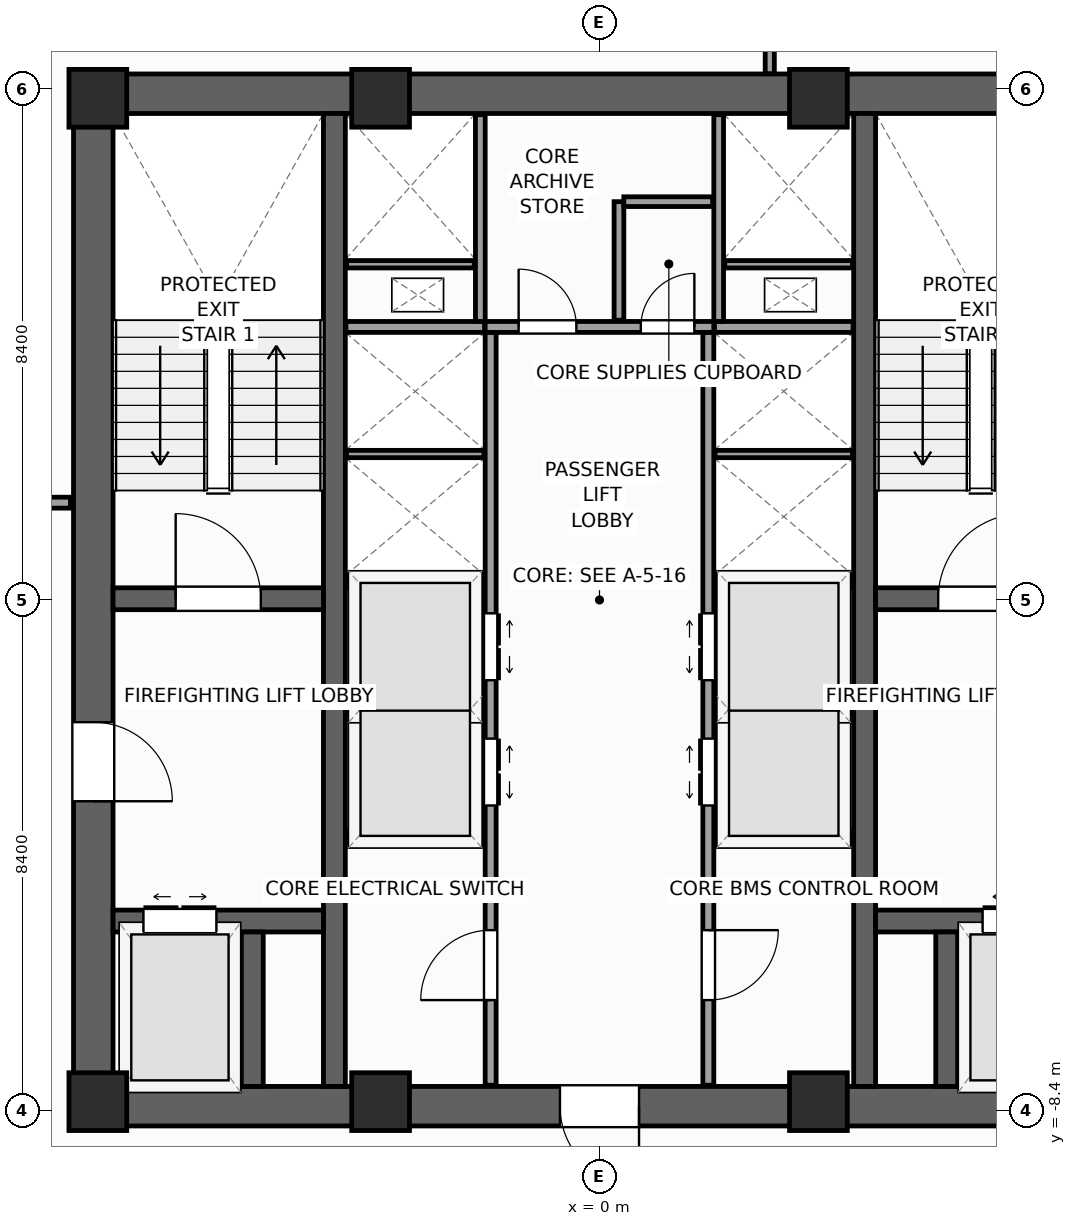
"""IFC4 building model, lengths in metres.
Left out: names, types, materials, properties, quantities, classifications, styles, units other than length and angle.
Written with IfcOpenShell. Run it as: python <this file> out.ifc"""

import sys

from ifc_helpers import new_model, si_unit, direction, frame, frame_2d, origin, origin_2d, place, context, subcontext, project, spatial, rectangle, extrude, source, transform, mapped, element, fill, save


model = new_model("IFC4")
c1 = context("Model", 3, precision=1e-05, world=origin(), true_north=direction((0.0, 1.0)))
c2 = subcontext(c1, "Body", "Model", "MODEL_VIEW")
j1 = project(units=[si_unit("LENGTHUNIT", "METRE"), si_unit("PLANEANGLEUNIT", "RADIAN")], contexts=[c1])
p1 = place(None, origin())
s1 = spatial("IfcSite", under=j1, at=p1, CompositionType="ELEMENT")
p2 = place(p1, origin())
s2 = spatial("IfcBuilding", under=s1, at=p2, CompositionType="ELEMENT")
p3 = place(p2, frame((0.0, 0.0, 196.4)))
s3 = spatial("IfcBuildingStorey", under=s2, at=p3, CompositionType="ELEMENT", Elevation=196.4)
p4 = place(p3, frame((-8.65, -8.325, 0.0), z_axis=(0.0, 0.0, 1.0), x_axis=(1.0, 0.0, 0.0)))
e1 = element("IfcWall", 1, at=p4, inside=s3, PredefinedType="SHEAR", context=c2, shape_type="SweptSolid", body=[
    extrude(rectangle(XDim=17.3, YDim=0.65, at=frame_2d((8.65, 0.0))), origin(), (0.0, 0.0, 1.0), 4.0),
])
p5 = place(p4, frame((8.0, 0.0, 0.0)))
e2 = element("IfcOpeningElement", 2, at=p5, cuts=e1, PredefinedType="OPENING", context=c2, shape_type="SweptSolid", body=[
    extrude(rectangle(XDim=1.3, YDim=2.2, at=frame_2d((0.65, 1.1))), frame((0.0, 0.335, 0.0), z_axis=(0.0, -1.0, 0.0), x_axis=(1.0, 0.0, 0.0)), (0.0, 0.0, 1.0), 0.67),
])
p6 = place(p3, frame((-8.65, 8.325, 0.0), z_axis=(0.0, 0.0, 1.0), x_axis=(1.0, 0.0, 0.0)))
e3 = element("IfcWall", 3, at=p6, inside=s3, PredefinedType="SHEAR", context=c2, shape_type="SweptSolid", body=[
    extrude(rectangle(XDim=17.3, YDim=0.65, at=frame_2d((8.65, 0.0))), origin(), (0.0, 0.0, 1.0), 4.0),
])
p7 = place(p3, frame((-8.325, -8.0, 0.0), z_axis=(0.0, 0.0, 1.0), x_axis=(0.0, 1.0, 0.0)))
e4 = element("IfcWall", 4, at=p7, inside=s3, PredefinedType="SHEAR", context=c2, shape_type="SweptSolid", body=[
    extrude(rectangle(XDim=16.0, YDim=0.65, at=frame_2d((8.0, 0.0))), origin(), (0.0, 0.0, 1.0), 4.0),
])
p8 = place(p7, frame((4.69, 0.0, 0.0)))
e5 = element("IfcOpeningElement", 5, at=p8, cuts=e4, PredefinedType="OPENING", context=c2, shape_type="SweptSolid", body=[
    extrude(rectangle(XDim=1.3, YDim=2.2, at=frame_2d((0.65, 1.1))), frame((0.0, 0.335, 0.0), z_axis=(0.0, -1.0, 0.0), x_axis=(1.0, 0.0, 0.0)), (0.0, 0.0, 1.0), 0.67),
])
for number, where, z_axis, x_axis in (
    (6, (-4.36, -8.0, 0.0), (0.0, 0.0, 1.0), (0.0, 1.0, 0.0)),
    (7, (4.36, -8.0, 0.0), (0.0, 0.0, 1.0), (0.0, 1.0, 0.0)),
):
    element("IfcWall", number, at=place(p3, frame(where, z_axis=z_axis, x_axis=x_axis)), inside=s3, PredefinedType="SHEAR", context=c2, shape_type="SweptSolid", body=[
        extrude(rectangle(XDim=16.0, YDim=0.36, at=frame_2d((8.0, 0.0))), origin(), (0.0, 0.0, 1.0), 4.0),
    ])
p9 = place(p3, frame((-8.0, 0.02, 0.0), z_axis=(0.0, 0.0, 1.0), x_axis=(1.0, 0.0, 0.0)))
e8 = element("IfcWall", 8, at=p9, inside=s3, PredefinedType="SHEAR", context=c2, shape_type="SweptSolid", body=[
    extrude(rectangle(XDim=3.46, YDim=0.36, at=frame_2d((1.73, 0.0))), origin(), (0.0, 0.0, 1.0), 4.0),
])
p10 = place(p9, frame((1.03, 0.0, 0.0)))
e9 = element("IfcOpeningElement", 9, at=p10, cuts=e8, PredefinedType="OPENING", context=c2, shape_type="SweptSolid", body=[
    extrude(rectangle(XDim=1.4, YDim=2.2, at=frame_2d((0.7, 1.1))), frame((0.0, 0.19, 0.0), z_axis=(0.0, -1.0, 0.0), x_axis=(1.0, 0.0, 0.0)), (0.0, 0.0, 1.0), 0.38),
])
p11 = place(p3, frame((4.54, 0.02, 0.0), z_axis=(0.0, 0.0, 1.0), x_axis=(1.0, 0.0, 0.0)))
e10 = element("IfcWall", 10, at=p11, inside=s3, PredefinedType="SHEAR", context=c2, shape_type="SweptSolid", body=[
    extrude(rectangle(XDim=3.46, YDim=0.36, at=frame_2d((1.73, 0.0))), origin(), (0.0, 0.0, 1.0), 4.0),
])
p12 = place(p11, frame((1.03, 0.0, 0.0)))
e11 = element("IfcOpeningElement", 11, at=p12, cuts=e10, PredefinedType="OPENING", context=c2, shape_type="SweptSolid", body=[
    extrude(rectangle(XDim=1.4, YDim=2.2, at=frame_2d((0.7, 1.1))), frame((0.0, 0.19, 0.0), z_axis=(0.0, -1.0, 0.0), x_axis=(1.0, 0.0, 0.0)), (0.0, 0.0, 1.0), 0.38),
])
p13 = place(p3, frame((-8.0, -5.28, 0.0), z_axis=(0.0, 0.0, 1.0), x_axis=(1.0, 0.0, 0.0)))
e12 = element("IfcWall", 12, at=p13, inside=s3, PredefinedType="SHEAR", context=c2, shape_type="SweptSolid", body=[
    extrude(rectangle(XDim=3.46, YDim=0.36, at=frame_2d((1.73, 0.0))), origin(), (0.0, 0.0, 1.0), 4.0),
])
p14 = place(p13, frame((0.5, 0.0, 0.0)))
e13 = element("IfcOpeningElement", 13, at=p14, cuts=e12, PredefinedType="OPENING", context=c2, shape_type="SweptSolid", body=[
    extrude(rectangle(XDim=1.2, YDim=2.25, at=frame_2d((0.6, 1.125))), frame((0.0, 0.19, 0.0), z_axis=(0.0, -1.0, 0.0), x_axis=(1.0, 0.0, 0.0)), (0.0, 0.0, 1.0), 0.38),
])
p15 = place(p3, frame((4.54, -5.28, 0.0), z_axis=(0.0, 0.0, 1.0), x_axis=(1.0, 0.0, 0.0)))
e14 = element("IfcWall", 14, at=p15, inside=s3, PredefinedType="SHEAR", context=c2, shape_type="SweptSolid", body=[
    extrude(rectangle(XDim=3.46, YDim=0.36, at=frame_2d((1.73, 0.0))), origin(), (0.0, 0.0, 1.0), 4.0),
])
p16 = place(p15, frame((1.76, 0.0, 0.0)))
e15 = element("IfcOpeningElement", 15, at=p16, cuts=e14, PredefinedType="OPENING", context=c2, shape_type="SweptSolid", body=[
    extrude(rectangle(XDim=1.2, YDim=2.25, at=frame_2d((0.6, 1.125))), frame((0.0, 0.19, 0.0), z_axis=(0.0, -1.0, 0.0), x_axis=(1.0, 0.0, 0.0)), (0.0, 0.0, 1.0), 0.38),
])
for number, where, z_axis, x_axis in (
    (16, (-5.71, -8.0, 0.0), (0.0, 0.0, 1.0), (0.0, 1.0, 0.0)),
    (17, (5.71, -8.0, 0.0), (0.0, 0.0, 1.0), (0.0, 1.0, 0.0)),
):
    element("IfcWall", number, at=place(p3, frame(where, z_axis=z_axis, x_axis=x_axis)), inside=s3, PredefinedType="SHEAR", context=c2, shape_type="SweptSolid", body=[
        extrude(rectangle(XDim=2.54, YDim=0.36, at=frame_2d((1.27, 0.0))), origin(), (0.0, 0.0, 1.0), 4.0),
    ])
m1 = source(origin(), c2, "Body", "SweptSolid", [
    extrude(rectangle(XDim=0.95, YDim=0.95, at=origin_2d()), origin(), (0.0, 0.0, 1.0), 4.0),
])
for number, where, z_axis, x_axis in (
    (18, (-8.25, -8.25, 0.0), (0.0, 0.0, 1.0), (1.0, 0.0, 0.0)),
    (19, (-8.25, 8.25, 0.0), (0.0, 0.0, 1.0), (1.0, 0.0, 0.0)),
    (20, (-3.6, -8.25, 0.0), (0.0, 0.0, 1.0), (1.0, 0.0, 0.0)),
    (21, (3.6, -8.25, 0.0), (0.0, 0.0, 1.0), (1.0, 0.0, 0.0)),
    (22, (-3.6, 8.25, 0.0), (0.0, 0.0, 1.0), (1.0, 0.0, 0.0)),
    (23, (3.6, 8.25, 0.0), (0.0, 0.0, 1.0), (1.0, 0.0, 0.0)),
):
    element("IfcColumn", number, at=place(p3, frame(where, z_axis=z_axis, x_axis=x_axis)), inside=s3, PredefinedType="PILASTER", context=c2, shape_type="MappedRepresentation", body=[
        mapped(m1, transform((0.0, 0.0, 0.0), scale=1.0)),
    ])
p17 = place(p3, frame((-1.79, -7.98, 0.0), z_axis=(0.0, 0.0, 1.0), x_axis=(0.0, 1.0, 0.0)))
e24 = element("IfcWall", 24, at=p17, inside=s3, PredefinedType="PARTITIONING", context=c2, shape_type="SweptSolid", body=[
    extrude(rectangle(XDim=12.38, YDim=0.18, at=frame_2d((6.19, 0.0))), origin(), (0.0, 0.0, 1.0), 3.6),
])
p18 = place(p17, frame((4.6, 0.0, 0.0)))
e25 = element("IfcOpeningElement", 25, at=p18, cuts=e24, PredefinedType="OPENING", context=c2, shape_type="SweptSolid", body=[
    extrude(rectangle(XDim=1.1, YDim=2.2, at=frame_2d((0.55, 1.1))), frame((0.0, 0.1, 0.0), z_axis=(0.0, -1.0, 0.0), x_axis=(1.0, 0.0, 0.0)), (0.0, 0.0, 1.0), 0.2),
])
p19 = place(p17, frame((6.66, 0.0, 0.0)))
e26 = element("IfcOpeningElement", 26, at=p19, cuts=e24, PredefinedType="OPENING", context=c2, shape_type="SweptSolid", body=[
    extrude(rectangle(XDim=1.1, YDim=2.2, at=frame_2d((0.55, 1.1))), frame((0.0, 0.1, 0.0), z_axis=(0.0, -1.0, 0.0), x_axis=(1.0, 0.0, 0.0)), (0.0, 0.0, 1.0), 0.2),
])
p20 = place(p17, frame((1.4, 0.0, 0.0)))
e27 = element("IfcOpeningElement", 27, at=p20, cuts=e24, PredefinedType="OPENING", context=c2, shape_type="SweptSolid", body=[
    extrude(rectangle(XDim=1.15, YDim=2.25, at=frame_2d((0.575, 1.125))), frame((0.0, 0.1, 0.0), z_axis=(0.0, -1.0, 0.0), x_axis=(1.0, 0.0, 0.0)), (0.0, 0.0, 1.0), 0.2),
])
p21 = place(p3, frame((1.79, -7.98, 0.0), z_axis=(0.0, 0.0, 1.0), x_axis=(0.0, 1.0, 0.0)))
e28 = element("IfcWall", 28, at=p21, inside=s3, PredefinedType="PARTITIONING", context=c2, shape_type="SweptSolid", body=[
    extrude(rectangle(XDim=12.38, YDim=0.18, at=frame_2d((6.19, 0.0))), origin(), (0.0, 0.0, 1.0), 3.6),
])
p22 = place(p21, frame((4.6, 0.0, 0.0)))
e29 = element("IfcOpeningElement", 29, at=p22, cuts=e28, PredefinedType="OPENING", context=c2, shape_type="SweptSolid", body=[
    extrude(rectangle(XDim=1.1, YDim=2.2, at=frame_2d((0.55, 1.1))), frame((0.0, 0.1, 0.0), z_axis=(0.0, -1.0, 0.0), x_axis=(1.0, 0.0, 0.0)), (0.0, 0.0, 1.0), 0.2),
])
p23 = place(p21, frame((6.66, 0.0, 0.0)))
e30 = element("IfcOpeningElement", 30, at=p23, cuts=e28, PredefinedType="OPENING", context=c2, shape_type="SweptSolid", body=[
    extrude(rectangle(XDim=1.1, YDim=2.2, at=frame_2d((0.55, 1.1))), frame((0.0, 0.1, 0.0), z_axis=(0.0, -1.0, 0.0), x_axis=(1.0, 0.0, 0.0)), (0.0, 0.0, 1.0), 0.2),
])
p24 = place(p21, frame((1.4, 0.0, 0.0)))
e31 = element("IfcOpeningElement", 31, at=p24, cuts=e28, PredefinedType="OPENING", context=c2, shape_type="SweptSolid", body=[
    extrude(rectangle(XDim=1.15, YDim=2.25, at=frame_2d((0.575, 1.125))), frame((0.0, 0.1, 0.0), z_axis=(0.0, -1.0, 0.0), x_axis=(1.0, 0.0, 0.0)), (0.0, 0.0, 1.0), 0.2),
])
p25 = place(p3, frame((-1.88, 4.49, 0.0), z_axis=(0.0, 0.0, 1.0), x_axis=(1.0, 0.0, 0.0)))
e32 = element("IfcWall", 32, at=p25, inside=s3, PredefinedType="PARTITIONING", context=c2, shape_type="SweptSolid", body=[
    extrude(rectangle(XDim=3.76, YDim=0.18, at=frame_2d((1.88, 0.0))), origin(), (0.0, 0.0, 1.0), 3.6),
])
p26 = place(p25, frame((0.55, 0.0, 0.0)))
e33 = element("IfcOpeningElement", 33, at=p26, cuts=e32, PredefinedType="OPENING", context=c2, shape_type="SweptSolid", body=[
    extrude(rectangle(XDim=0.95, YDim=2.1, at=frame_2d((0.475, 1.05))), frame((0.0, 0.1, 0.0), z_axis=(0.0, -1.0, 0.0), x_axis=(1.0, 0.0, 0.0)), (0.0, 0.0, 1.0), 0.2),
])
p27 = place(p25, frame((2.56, 0.0, 0.0)))
e34 = element("IfcOpeningElement", 34, at=p27, cuts=e32, PredefinedType="OPENING", context=c2, shape_type="SweptSolid", body=[
    extrude(rectangle(XDim=0.88, YDim=2.1, at=frame_2d((0.44, 1.05))), frame((0.0, 0.1, 0.0), z_axis=(0.0, -1.0, 0.0), x_axis=(1.0, 0.0, 0.0)), (0.0, 0.0, 1.0), 0.2),
])
for number, where, z_axis, x_axis in (
    (35, (-4.17, -3.9, 0.0), (0.0, 0.0, 1.0), (1.0, 0.0, 0.0)),
    (36, (1.89, -3.9, 0.0), (0.0, 0.0, 1.0), (1.0, 0.0, 0.0)),
    (37, (-4.17, 0.3, 0.0), (0.0, 0.0, 1.0), (1.0, 0.0, 0.0)),
    (38, (1.89, 0.3, 0.0), (0.0, 0.0, 1.0), (1.0, 0.0, 0.0)),
    (39, (-4.17, 4.49, 0.0), (0.0, 0.0, 1.0), (1.0, 0.0, 0.0)),
    (40, (1.89, 4.49, 0.0), (0.0, 0.0, 1.0), (1.0, 0.0, 0.0)),
):
    element("IfcWall", number, at=place(p3, frame(where, z_axis=z_axis, x_axis=x_axis)), inside=s3, PredefinedType="PARTITIONING", context=c2, shape_type="SweptSolid", body=[
        extrude(rectangle(XDim=2.28, YDim=0.18, at=frame_2d((1.14, 0.0))), origin(), (0.0, 0.0, 1.0), 3.6),
    ])
for number, where, z_axis, x_axis in (
    (41, (-4.16, -1.8, 0.0), (0.0, 0.0, 1.0), (1.0, 0.0, 0.0)),
    (42, (1.9, -1.8, 0.0), (0.0, 0.0, 1.0), (1.0, 0.0, 0.0)),
    (43, (-4.16, 2.4, 0.0), (0.0, 0.0, 1.0), (1.0, 0.0, 0.0)),
    (44, (1.9, 2.4, 0.0), (0.0, 0.0, 1.0), (1.0, 0.0, 0.0)),
):
    element("IfcWall", number, at=place(p3, frame(where, z_axis=z_axis, x_axis=x_axis)), inside=s3, PredefinedType="PARTITIONING", context=c2, shape_type="SweptSolid", body=[
        extrude(rectangle(XDim=2.26, YDim=0.12, at=frame_2d((1.13, 0.0))), origin(), (0.0, 0.0, 1.0), 3.6),
    ])
for number, where, z_axis, x_axis in (
    (45, (-1.96, 4.58, 0.0), (0.0, 0.0, 1.0), (0.0, 1.0, 0.0)),
    (46, (1.96, 4.58, 0.0), (0.0, 0.0, 1.0), (0.0, 1.0, 0.0)),
):
    element("IfcWall", number, at=place(p3, frame(where, z_axis=z_axis, x_axis=x_axis)), inside=s3, PredefinedType="PARTITIONING", context=c2, shape_type="SweptSolid", body=[
        extrude(rectangle(XDim=3.4, YDim=0.16, at=frame_2d((1.7, 0.0))), origin(), (0.0, 0.0, 1.0), 3.6),
    ])
for number, where, z_axis, x_axis in (
    (47, (-4.16, 5.52, 0.0), (0.0, 0.0, 1.0), (1.0, 0.0, 0.0)),
    (48, (2.06, 5.52, 0.0), (0.0, 0.0, 1.0), (1.0, 0.0, 0.0)),
):
    element("IfcWall", number, at=place(p3, frame(where, z_axis=z_axis, x_axis=x_axis)), inside=s3, PredefinedType="PARTITIONING", context=c2, shape_type="SweptSolid", body=[
        extrude(rectangle(XDim=2.1, YDim=0.12, at=frame_2d((1.05, 0.0))), origin(), (0.0, 0.0, 1.0), 3.6),
    ])
p28 = place(p3, frame((0.32, 4.6, 0.0), z_axis=(0.0, 0.0, 1.0), x_axis=(0.0, 1.0, 0.0)))
e49 = element("IfcWall", 49, at=p28, inside=s3, PredefinedType="PARTITIONING", context=c2, shape_type="SweptSolid", body=[
    extrude(rectangle(XDim=1.95, YDim=0.16, at=frame_2d((0.975, 0.0))), origin(), (0.0, 0.0, 1.0), 3.6),
])
p29 = place(p3, frame((0.4, 6.55, 0.0), z_axis=(0.0, 0.0, 1.0), x_axis=(1.0, 0.0, 0.0)))
e50 = element("IfcWall", 50, at=p29, inside=s3, PredefinedType="PARTITIONING", context=c2, shape_type="SweptSolid", body=[
    extrude(rectangle(XDim=1.46, YDim=0.16, at=frame_2d((0.73, 0.0))), origin(), (0.0, 0.0, 1.0), 3.6),
])
p30 = place(p3, frame((-12.6, 1.6, 0.0), z_axis=(0.0, 0.0, 1.0), x_axis=(1.0, 0.0, 0.0)))
e51 = element("IfcWall", 51, at=p30, inside=s3, PredefinedType="PARTITIONING", context=c2, shape_type="SweptSolid", body=[
    extrude(rectangle(XDim=3.9, YDim=0.18, at=frame_2d((1.95, 0.0))), origin(), (0.0, 0.0, 1.0), 3.6),
])
p31 = place(p30, frame((1.4, 0.0, 0.0)))
e52 = element("IfcOpeningElement", 52, at=p31, cuts=e51, PredefinedType="OPENING", context=c2, shape_type="SweptSolid", body=[
    extrude(rectangle(XDim=1.1, YDim=2.2, at=frame_2d((0.55, 1.1))), frame((0.0, 0.1, 0.0), z_axis=(0.0, -1.0, 0.0), x_axis=(1.0, 0.0, 0.0)), (0.0, 0.0, 1.0), 0.2),
])
p32 = place(p3, frame((2.8, 8.655, 0.0), z_axis=(0.0, 0.0, 1.0), x_axis=(0.0, 1.0, 0.0)))
e53 = element("IfcWall", 53, at=p32, inside=s3, PredefinedType="PARTITIONING", context=c2, shape_type="SweptSolid", body=[
    extrude(rectangle(XDim=23.362, YDim=0.15, at=frame_2d((11.681, 0.0))), origin(), (0.0, 0.0, 1.0), 3.6),
])
m2 = source(origin(), c2, "Body", "SweptSolid", [
    extrude(rectangle(XDim=1.4, YDim=2.2, at=frame_2d((0.7, 1.1))), frame((0.0, 0.025, 0.0), z_axis=(0.0, -1.0, 0.0), x_axis=(1.0, 0.0, 0.0)), (0.0, 0.0, 1.0), 0.05),
])
p33 = place(p10, origin())
e54 = element("IfcDoor", 54, at=p33, inside=s3, OperationType="SINGLE_SWING_LEFT", PredefinedType="DOOR", context=c2, shape_type="MappedRepresentation", body=[
    mapped(m2, transform((0.0, 0.0, 0.0), scale=1.0)),
])
fill(e9, e54)
p34 = place(p12, origin())
e55 = element("IfcDoor", 55, at=p34, inside=s3, OperationType="SINGLE_SWING_RIGHT", PredefinedType="DOOR", context=c2, shape_type="MappedRepresentation", body=[
    mapped(m2, transform((0.0, 0.0, 0.0), scale=1.0)),
])
fill(e11, e55)
m3 = source(origin(), c2, "Body", "SweptSolid", [
    extrude(rectangle(XDim=1.3, YDim=2.2, at=frame_2d((0.65, 1.1))), frame((0.0, 0.025, 0.0), z_axis=(0.0, -1.0, 0.0), x_axis=(1.0, 0.0, 0.0)), (0.0, 0.0, 1.0), 0.05),
])
p35 = place(p8, frame((1.3, 0.0, 0.0), z_axis=(0.0, 0.0, 1.0), x_axis=(-1.0, 0.0, 0.0)))
e56 = element("IfcDoor", 56, at=p35, inside=s3, OperationType="SINGLE_SWING_LEFT", PredefinedType="DOOR", context=c2, shape_type="MappedRepresentation", body=[
    mapped(m3, transform((0.0, 0.0, 0.0), scale=1.0)),
])
fill(e5, e56)
p36 = place(p5, frame((1.3, 0.0, 0.0), z_axis=(0.0, 0.0, 1.0), x_axis=(-1.0, 0.0, 0.0)))
e57 = element("IfcDoor", 57, at=p36, inside=s3, OperationType="SINGLE_SWING_RIGHT", PredefinedType="DOOR", context=c2, shape_type="MappedRepresentation", body=[
    mapped(m3, transform((0.0, 0.0, 0.0), scale=1.0)),
])
fill(e2, e57)
m4 = source(origin(), c2, "Body", "SweptSolid", [
    extrude(rectangle(XDim=1.2, YDim=2.25, at=frame_2d((0.6, 1.125))), frame((0.0, 0.025, 0.0), z_axis=(0.0, -1.0, 0.0), x_axis=(1.0, 0.0, 0.0)), (0.0, 0.0, 1.0), 0.05),
])
p37 = place(p14, origin())
e58 = element("IfcDoor", 58, at=p37, inside=s3, OperationType="DOUBLE_DOOR_SLIDING", PredefinedType="DOOR", context=c2, shape_type="MappedRepresentation", body=[
    mapped(m4, transform((0.0, 0.0, 0.0), scale=1.0)),
])
fill(e13, e58)
p38 = place(p16, origin())
e59 = element("IfcDoor", 59, at=p38, inside=s3, OperationType="DOUBLE_DOOR_SLIDING", PredefinedType="DOOR", context=c2, shape_type="MappedRepresentation", body=[
    mapped(m4, transform((0.0, 0.0, 0.0), scale=1.0)),
])
fill(e15, e59)
m5 = source(origin(), c2, "Body", "SweptSolid", [
    extrude(rectangle(XDim=1.1, YDim=2.2, at=frame_2d((0.55, 1.1))), frame((0.0, 0.025, 0.0), z_axis=(0.0, -1.0, 0.0), x_axis=(1.0, 0.0, 0.0)), (0.0, 0.0, 1.0), 0.05),
])
p39 = place(p18, frame((1.1, 0.0, 0.0), z_axis=(0.0, 0.0, 1.0), x_axis=(-1.0, 0.0, 0.0)))
e60 = element("IfcDoor", 60, at=p39, inside=s3, OperationType="DOUBLE_DOOR_SLIDING", PredefinedType="DOOR", context=c2, shape_type="MappedRepresentation", body=[
    mapped(m5, transform((0.0, 0.0, 0.0), scale=1.0)),
])
fill(e25, e60)
p40 = place(p19, frame((1.1, 0.0, 0.0), z_axis=(0.0, 0.0, 1.0), x_axis=(-1.0, 0.0, 0.0)))
e61 = element("IfcDoor", 61, at=p40, inside=s3, OperationType="DOUBLE_DOOR_SLIDING", PredefinedType="DOOR", context=c2, shape_type="MappedRepresentation", body=[
    mapped(m5, transform((0.0, 0.0, 0.0), scale=1.0)),
])
fill(e26, e61)
p41 = place(p22, origin())
e62 = element("IfcDoor", 62, at=p41, inside=s3, OperationType="DOUBLE_DOOR_SLIDING", PredefinedType="DOOR", context=c2, shape_type="MappedRepresentation", body=[
    mapped(m5, transform((0.0, 0.0, 0.0), scale=1.0)),
])
fill(e29, e62)
p42 = place(p23, origin())
e63 = element("IfcDoor", 63, at=p42, inside=s3, OperationType="DOUBLE_DOOR_SLIDING", PredefinedType="DOOR", context=c2, shape_type="MappedRepresentation", body=[
    mapped(m5, transform((0.0, 0.0, 0.0), scale=1.0)),
])
fill(e30, e63)
m6 = source(origin(), c2, "Body", "SweptSolid", [
    extrude(rectangle(XDim=1.15, YDim=2.25, at=frame_2d((0.575, 1.125))), frame((0.0, 0.025, 0.0), z_axis=(0.0, -1.0, 0.0), x_axis=(1.0, 0.0, 0.0)), (0.0, 0.0, 1.0), 0.05),
])
p43 = place(p20, origin())
e64 = element("IfcDoor", 64, at=p43, inside=s3, OperationType="SINGLE_SWING_LEFT", PredefinedType="DOOR", context=c2, shape_type="MappedRepresentation", body=[
    mapped(m6, transform((0.0, 0.0, 0.0), scale=1.0)),
])
fill(e27, e64)
p44 = place(p24, frame((1.15, 0.0, 0.0), z_axis=(0.0, 0.0, 1.0), x_axis=(-1.0, 0.0, 0.0)))
e65 = element("IfcDoor", 65, at=p44, inside=s3, OperationType="SINGLE_SWING_RIGHT", PredefinedType="DOOR", context=c2, shape_type="MappedRepresentation", body=[
    mapped(m6, transform((0.0, 0.0, 0.0), scale=1.0)),
])
fill(e31, e65)
m7 = source(origin(), c2, "Body", "SweptSolid", [
    extrude(rectangle(XDim=0.95, YDim=2.1, at=frame_2d((0.475, 1.05))), frame((0.0, 0.025, 0.0), z_axis=(0.0, -1.0, 0.0), x_axis=(1.0, 0.0, 0.0)), (0.0, 0.0, 1.0), 0.05),
])
p45 = place(p26, origin())
e66 = element("IfcDoor", 66, at=p45, inside=s3, OperationType="SINGLE_SWING_LEFT", PredefinedType="DOOR", context=c2, shape_type="MappedRepresentation", body=[
    mapped(m7, transform((0.0, 0.0, 0.0), scale=1.0)),
])
fill(e33, e66)
m8 = source(origin(), c2, "Body", "SweptSolid", [
    extrude(rectangle(XDim=0.88, YDim=2.1, at=frame_2d((0.44, 1.05))), frame((0.0, 0.025, 0.0), z_axis=(0.0, -1.0, 0.0), x_axis=(1.0, 0.0, 0.0)), (0.0, 0.0, 1.0), 0.05),
])
p46 = place(p27, origin())
e67 = element("IfcDoor", 67, at=p46, inside=s3, OperationType="SINGLE_SWING_RIGHT", PredefinedType="DOOR", context=c2, shape_type="MappedRepresentation", body=[
    mapped(m8, transform((0.0, 0.0, 0.0), scale=1.0)),
])
fill(e34, e67)
save(model, sys.argv[1])
